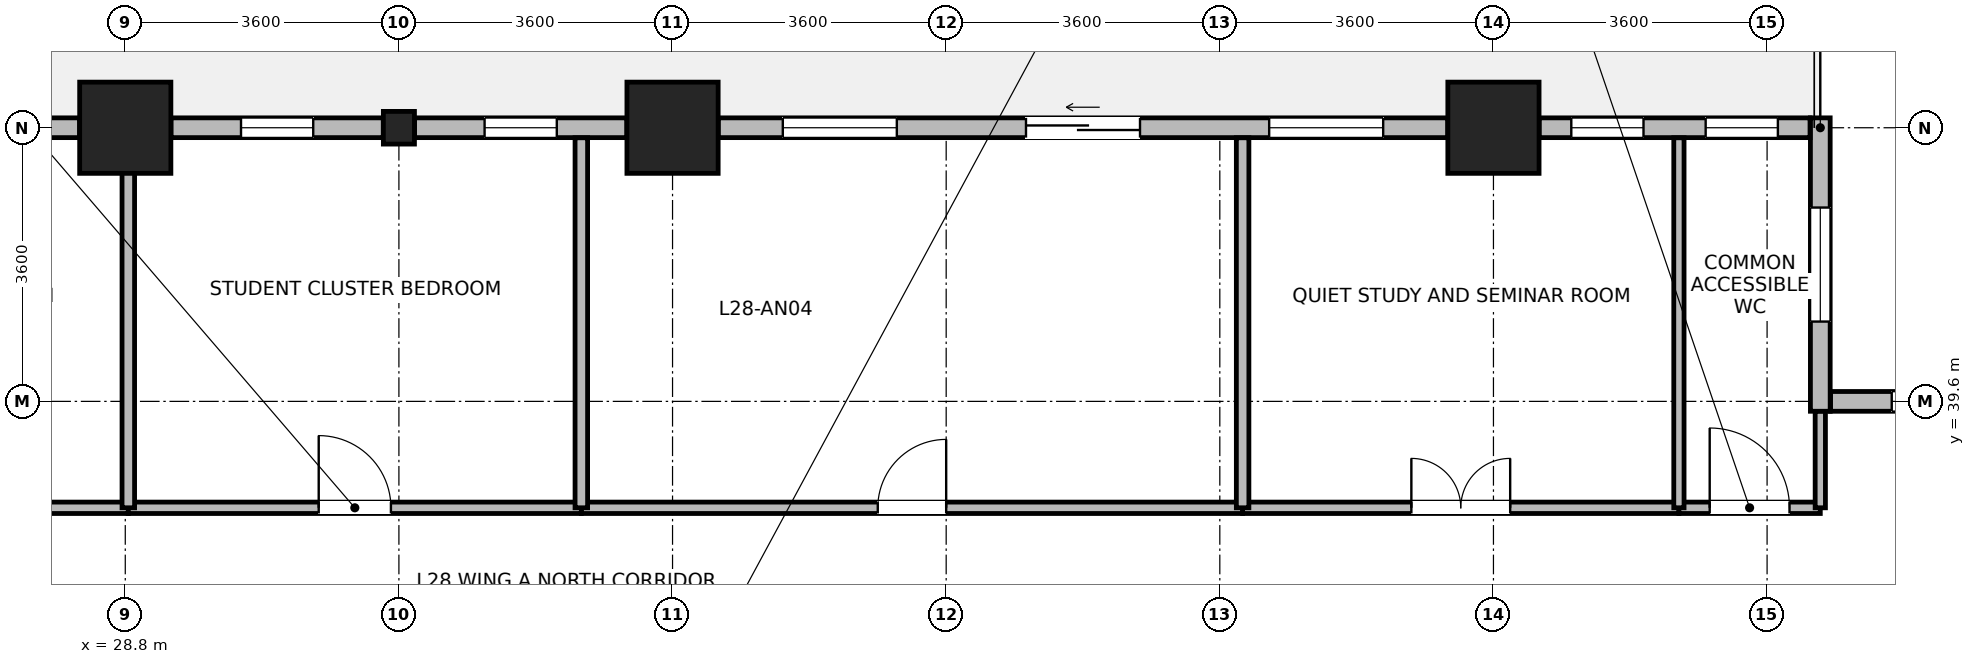
"""IFC4 building model, lengths in metres.
Left out: names, types, materials, properties, quantities, classifications, styles, units other than length and angle.
Written with IfcOpenShell. Run it as: python <this file> out.ifc"""

import sys

from ifc_helpers import new_model, si_unit, direction, frame, frame_2d, origin, origin_2d, place, context, subcontext, project, spatial, rectangle, i_section, extrude, source, transform, mapped, element, fill, save


model = new_model("IFC4")
c1 = context("Model", 3, precision=1e-05, world=origin(), true_north=direction((0.0, 1.0)))
c2 = subcontext(c1, "Body", "Model", "MODEL_VIEW")
j1 = project(units=[si_unit("LENGTHUNIT", "METRE"), si_unit("PLANEANGLEUNIT", "RADIAN")], contexts=[c1])
p1 = place(None, origin())
s1 = spatial("IfcSite", under=j1, at=p1, CompositionType="ELEMENT")
p2 = place(p1, origin())
s2 = spatial("IfcBuilding", under=s1, at=p2, CompositionType="ELEMENT")
p3 = place(p2, frame((0.0, 0.0, 111.9)))
s3 = spatial("IfcBuildingStorey", under=s2, at=p3, CompositionType="ELEMENT", Elevation=111.9)
m1 = source(origin(), c2, "Body", "SweptSolid", [
    extrude(rectangle(XDim=1.2, YDim=1.2, at=origin_2d()), origin(), (0.0, 0.0, 1.0), 3.7),
])
for number, where, z_axis, x_axis in (
    (1, (28.8, 43.2, 0.0), (0.0, 0.0, 1.0), (1.0, 0.0, 0.0)),
    (2, (36.0, 43.2, 0.0), (0.0, 0.0, 1.0), (1.0, 0.0, 0.0)),
    (3, (46.8, 43.2, 0.0), (0.0, 0.0, 1.0), (1.0, 0.0, 0.0)),
):
    element("IfcColumn", number, at=place(p3, frame(where, z_axis=z_axis, x_axis=x_axis)), inside=s3, PredefinedType="COLUMN", context=c2, shape_type="MappedRepresentation", body=[
        mapped(m1, transform((0.0, 0.0, 0.0), x_axis=(1.0, 0.0, 0.0), y_axis=(0.0, 1.0, 0.0), z_axis=(0.0, 0.0, 1.0), scale=1.0)),
    ])
m2 = source(origin(), c2, "Body", "SweptSolid", [
    extrude(i_section(OverallWidth=0.409, OverallDepth=0.43, WebThickness=0.024, FlangeThickness=0.033, FilletRadius=0.015, at=origin_2d()), origin(), (0.0, 0.0, 1.0), 3.7),
])
p4 = place(p3, frame((32.4, 43.2, 0.0), z_axis=(0.0, 0.0, 1.0), x_axis=(1.0, 0.0, 0.0)))
e4 = element("IfcColumn", 4, at=p4, inside=s3, PredefinedType="COLUMN", context=c2, shape_type="MappedRepresentation", body=[
    mapped(m2, transform((0.0, 0.0, 0.0), x_axis=(1.0, 0.0, 0.0), y_axis=(0.0, 1.0, 0.0), z_axis=(0.0, 0.0, 1.0), scale=1.0)),
])
p5 = place(p3, frame((51.235, 39.6, 0.0), z_axis=(0.0, 0.0, 1.0), x_axis=(1.0, 0.0, 0.0)))
e5 = element("IfcWall", 5, at=p5, inside=s3, PredefinedType="STANDARD", context=c2, shape_type="SweptSolid", body=[
    extrude(rectangle(XDim=9.33, YDim=0.26, at=frame_2d((4.665, 0.0))), origin(), (0.0, 0.0, 1.0), 3.43),
])
p6 = place(p5, frame((0.805, 0.0, 0.85)))
e6 = element("IfcOpeningElement", 6, at=p6, cuts=e5, PredefinedType="OPENING", context=c2, shape_type="SweptSolid", body=[
    extrude(rectangle(XDim=1.5, YDim=1.85, at=frame_2d((0.75, 0.925))), frame((0.0, 0.14, 0.0), z_axis=(0.0, -1.0, 0.0), x_axis=(1.0, 0.0, 0.0)), (0.0, 0.0, 1.0), 0.28),
])
p7 = place(p5, frame((3.915, 0.0, 0.85)))
e7 = element("IfcOpeningElement", 7, at=p7, cuts=e5, PredefinedType="OPENING", context=c2, shape_type="SweptSolid", body=[
    extrude(rectangle(XDim=1.5, YDim=1.85, at=frame_2d((0.75, 0.925))), frame((0.0, 0.14, 0.0), z_axis=(0.0, -1.0, 0.0), x_axis=(1.0, 0.0, 0.0)), (0.0, 0.0, 1.0), 0.28),
])
p8 = place(p5, frame((7.025, 0.0, 0.85)))
e8 = element("IfcOpeningElement", 8, at=p8, cuts=e5, PredefinedType="OPENING", context=c2, shape_type="SweptSolid", body=[
    extrude(rectangle(XDim=1.5, YDim=1.85, at=frame_2d((0.75, 0.925))), frame((0.0, 0.14, 0.0), z_axis=(0.0, -1.0, 0.0), x_axis=(1.0, 0.0, 0.0)), (0.0, 0.0, 1.0), 0.28),
])
p9 = place(p3, frame((51.1, 43.33, 0.0), z_axis=(0.0, 0.0, 1.0), x_axis=(0.0, -1.0, 0.0)))
e9 = element("IfcWall", 9, at=p9, inside=s3, PredefinedType="STANDARD", context=c2, shape_type="SweptSolid", body=[
    extrude(rectangle(XDim=3.86, YDim=0.26, at=frame_2d((1.93, 0.0))), origin(), (0.0, 0.0, 1.0), 3.43),
])
p10 = place(p9, frame((1.18, 0.0, 0.85)))
e10 = element("IfcOpeningElement", 10, at=p10, cuts=e9, PredefinedType="OPENING", context=c2, shape_type="SweptSolid", body=[
    extrude(rectangle(XDim=1.5, YDim=1.85, at=frame_2d((0.75, 0.925))), frame((0.0, 0.14, 0.0), z_axis=(0.0, -1.0, 0.0), x_axis=(1.0, 0.0, 0.0)), (0.0, 0.0, 1.0), 0.28),
])
p11 = place(p3, frame((47.401, 43.2, 0.0), z_axis=(0.0, 0.0, 1.0), x_axis=(1.0, 0.0, 0.0)))
e11 = element("IfcWall", 11, at=p11, inside=s3, PredefinedType="STANDARD", context=c2, shape_type="SweptSolid", body=[
    extrude(rectangle(XDim=3.564, YDim=0.26, at=frame_2d((1.782, 0.0))), origin(), (0.0, 0.0, 1.0), 3.43),
])
p12 = place(p11, frame((0.423, 0.0, 0.85)))
e12 = element("IfcOpeningElement", 12, at=p12, cuts=e11, PredefinedType="OPENING", context=c2, shape_type="SweptSolid", body=[
    extrude(rectangle(XDim=0.95, YDim=1.75, at=frame_2d((0.475, 0.875))), frame((0.0, 0.14, 0.0), z_axis=(0.0, -1.0, 0.0), x_axis=(1.0, 0.0, 0.0)), (0.0, 0.0, 1.0), 0.28),
])
p13 = place(p11, frame((2.191, 0.0, 0.85)))
e13 = element("IfcOpeningElement", 13, at=p13, cuts=e11, PredefinedType="OPENING", context=c2, shape_type="SweptSolid", body=[
    extrude(rectangle(XDim=0.95, YDim=1.75, at=frame_2d((0.475, 0.875))), frame((0.0, 0.14, 0.0), z_axis=(0.0, -1.0, 0.0), x_axis=(1.0, 0.0, 0.0)), (0.0, 0.0, 1.0), 0.28),
])
p14 = place(p3, frame((36.601, 43.2, 0.0), z_axis=(0.0, 0.0, 1.0), x_axis=(1.0, 0.0, 0.0)))
e14 = element("IfcWall", 14, at=p14, inside=s3, PredefinedType="STANDARD", context=c2, shape_type="SweptSolid", body=[
    extrude(rectangle(XDim=9.598, YDim=0.26, at=frame_2d((4.799, 0.0))), origin(), (0.0, 0.0, 1.0), 2.98),
])
p15 = place(p14, frame((4.049, 0.0, 0.0)))
e15 = element("IfcOpeningElement", 15, at=p15, cuts=e14, PredefinedType="OPENING", context=c2, shape_type="SweptSolid", body=[
    extrude(rectangle(XDim=1.5, YDim=2.15, at=frame_2d((0.75, 1.075))), frame((0.0, 0.14, 0.0), z_axis=(0.0, -1.0, 0.0), x_axis=(1.0, 0.0, 0.0)), (0.0, 0.0, 1.0), 0.28),
])
p16 = place(p14, frame((0.85, 0.0, 0.85)))
e16 = element("IfcOpeningElement", 16, at=p16, cuts=e14, PredefinedType="OPENING", context=c2, shape_type="SweptSolid", body=[
    extrude(rectangle(XDim=1.5, YDim=1.85, at=frame_2d((0.75, 0.925))), frame((0.0, 0.14, 0.0), z_axis=(0.0, -1.0, 0.0), x_axis=(1.0, 0.0, 0.0)), (0.0, 0.0, 1.0), 0.28),
])
p17 = place(p14, frame((7.248, 0.0, 0.85)))
e17 = element("IfcOpeningElement", 17, at=p17, cuts=e14, PredefinedType="OPENING", context=c2, shape_type="SweptSolid", body=[
    extrude(rectangle(XDim=1.5, YDim=1.85, at=frame_2d((0.75, 0.925))), frame((0.0, 0.14, 0.0), z_axis=(0.0, -1.0, 0.0), x_axis=(1.0, 0.0, 0.0)), (0.0, 0.0, 1.0), 0.28),
])
p18 = place(p3, frame((32.605, 43.2, 0.0), z_axis=(0.0, 0.0, 1.0), x_axis=(1.0, 0.0, 0.0)))
e18 = element("IfcWall", 18, at=p18, inside=s3, PredefinedType="STANDARD", context=c2, shape_type="SweptSolid", body=[
    extrude(rectangle(XDim=2.793, YDim=0.26, at=frame_2d((1.397, 0.0))), origin(), (0.0, 0.0, 1.0), 2.98),
])
p19 = place(p18, frame((0.922, 0.0, 0.85)))
e19 = element("IfcOpeningElement", 19, at=p19, cuts=e18, PredefinedType="OPENING", context=c2, shape_type="SweptSolid", body=[
    extrude(rectangle(XDim=0.95, YDim=1.75, at=frame_2d((0.475, 0.875))), frame((0.0, 0.14, 0.0), z_axis=(0.0, -1.0, 0.0), x_axis=(1.0, 0.0, 0.0)), (0.0, 0.0, 1.0), 0.28),
])
p20 = place(p3, frame((29.401, 43.2, 0.0), z_axis=(0.0, 0.0, 1.0), x_axis=(1.0, 0.0, 0.0)))
e20 = element("IfcWall", 20, at=p20, inside=s3, PredefinedType="STANDARD", context=c2, shape_type="SweptSolid", body=[
    extrude(rectangle(XDim=2.794, YDim=0.26, at=frame_2d((1.397, 0.0))), origin(), (0.0, 0.0, 1.0), 2.98),
])
p21 = place(p20, frame((0.922, 0.0, 0.85)))
e21 = element("IfcOpeningElement", 21, at=p21, cuts=e20, PredefinedType="OPENING", context=c2, shape_type="SweptSolid", body=[
    extrude(rectangle(XDim=0.95, YDim=1.75, at=frame_2d((0.475, 0.875))), frame((0.0, 0.14, 0.0), z_axis=(0.0, -1.0, 0.0), x_axis=(1.0, 0.0, 0.0)), (0.0, 0.0, 1.0), 0.28),
])
p22 = place(p3, frame((25.406, 43.2, 0.0), z_axis=(0.0, 0.0, 1.0), x_axis=(1.0, 0.0, 0.0)))
e22 = element("IfcWall", 22, at=p22, inside=s3, PredefinedType="STANDARD", context=c2, shape_type="SweptSolid", body=[
    extrude(rectangle(XDim=2.793, YDim=0.26, at=frame_2d((1.397, 0.0))), origin(), (0.0, 0.0, 1.0), 2.98),
])
p23 = place(p22, frame((0.922, 0.0, 0.85)))
e23 = element("IfcOpeningElement", 23, at=p23, cuts=e22, PredefinedType="OPENING", context=c2, shape_type="SweptSolid", body=[
    extrude(rectangle(XDim=0.95, YDim=1.75, at=frame_2d((0.475, 0.875))), frame((0.0, 0.14, 0.0), z_axis=(0.0, -1.0, 0.0), x_axis=(1.0, 0.0, 0.0)), (0.0, 0.0, 1.0), 0.28),
])
p24 = place(p3, frame((34.8, 38.2, 0.0), z_axis=(0.0, 0.0, 1.0), x_axis=(1.0, 0.0, 0.0)))
e24 = element("IfcWall", 24, at=p24, inside=s3, PredefinedType="PARTITIONING", context=c2, shape_type="SweptSolid", body=[
    extrude(rectangle(XDim=8.7, YDim=0.15, at=frame_2d((4.35, 0.0))), origin(), (0.0, 0.0, 1.0), 3.43),
])
p25 = place(p24, frame((3.9, 0.0, 0.0)))
e25 = element("IfcOpeningElement", 25, at=p25, cuts=e24, PredefinedType="OPENING", context=c2, shape_type="SweptSolid", body=[
    extrude(rectangle(XDim=0.9, YDim=2.08, at=frame_2d((0.45, 1.04))), frame((0.0, 0.085, 0.0), z_axis=(0.0, -1.0, 0.0), x_axis=(1.0, 0.0, 0.0)), (0.0, 0.0, 1.0), 0.17),
])
p26 = place(p3, frame((22.42, 38.2, 0.0), z_axis=(0.0, 0.0, 1.0), x_axis=(1.0, 0.0, 0.0)))
e26 = element("IfcWall", 26, at=p26, inside=s3, PredefinedType="PARTITIONING", context=c2, shape_type="SweptSolid", body=[
    extrude(rectangle(XDim=6.42, YDim=0.15, at=frame_2d((3.21, 0.0))), origin(), (0.0, 0.0, 1.0), 3.43),
])
p27 = place(p26, frame((2.56, 0.0, 0.0)))
e27 = element("IfcOpeningElement", 27, at=p27, cuts=e26, PredefinedType="OPENING", context=c2, shape_type="SweptSolid", body=[
    extrude(rectangle(XDim=1.3, YDim=2.12, at=frame_2d((0.65, 1.06))), frame((0.0, 0.085, 0.0), z_axis=(0.0, -1.0, 0.0), x_axis=(1.0, 0.0, 0.0)), (0.0, 0.0, 1.0), 0.17),
])
p28 = place(p3, frame((28.84, 38.2, 0.0), z_axis=(0.0, 0.0, 1.0), x_axis=(1.0, 0.0, 0.0)))
e28 = element("IfcWall", 28, at=p28, inside=s3, PredefinedType="PARTITIONING", context=c2, shape_type="SweptSolid", body=[
    extrude(rectangle(XDim=5.96, YDim=0.15, at=frame_2d((2.98, 0.0))), origin(), (0.0, 0.0, 1.0), 3.43),
])
p29 = place(p28, frame((2.505, 0.0, 0.0)))
e29 = element("IfcOpeningElement", 29, at=p29, cuts=e28, PredefinedType="OPENING", context=c2, shape_type="SweptSolid", body=[
    extrude(rectangle(XDim=0.95, YDim=2.1, at=frame_2d((0.475, 1.05))), frame((0.0, 0.085, 0.0), z_axis=(0.0, -1.0, 0.0), x_axis=(1.0, 0.0, 0.0)), (0.0, 0.0, 1.0), 0.17),
])
p30 = place(p3, frame((43.5, 38.2, 0.0), z_axis=(0.0, 0.0, 1.0), x_axis=(1.0, 0.0, 0.0)))
e30 = element("IfcWall", 30, at=p30, inside=s3, PredefinedType="PARTITIONING", context=c2, shape_type="SweptSolid", body=[
    extrude(rectangle(XDim=5.74, YDim=0.15, at=frame_2d((2.87, 0.0))), origin(), (0.0, 0.0, 1.0), 3.43),
])
p31 = place(p30, frame((2.22, 0.0, 0.0)))
e31 = element("IfcOpeningElement", 31, at=p31, cuts=e30, PredefinedType="OPENING", context=c2, shape_type="SweptSolid", body=[
    extrude(rectangle(XDim=1.3, YDim=2.12, at=frame_2d((0.65, 1.06))), frame((0.0, 0.085, 0.0), z_axis=(0.0, -1.0, 0.0), x_axis=(1.0, 0.0, 0.0)), (0.0, 0.0, 1.0), 0.17),
])
p32 = place(p3, frame((49.24, 38.2, 0.0), z_axis=(0.0, 0.0, 1.0), x_axis=(1.0, 0.0, 0.0)))
e32 = element("IfcWall", 32, at=p32, inside=s3, PredefinedType="PARTITIONING", context=c2, shape_type="SweptSolid", body=[
    extrude(rectangle(XDim=1.86, YDim=0.15, at=frame_2d((0.93, 0.0))), origin(), (0.0, 0.0, 1.0), 3.43),
])
p33 = place(p32, frame((0.405, 0.0, 0.0)))
e33 = element("IfcOpeningElement", 33, at=p33, cuts=e32, PredefinedType="OPENING", context=c2, shape_type="SweptSolid", body=[
    extrude(rectangle(XDim=1.05, YDim=2.12, at=frame_2d((0.525, 1.06))), frame((0.0, 0.085, 0.0), z_axis=(0.0, -1.0, 0.0), x_axis=(1.0, 0.0, 0.0)), (0.0, 0.0, 1.0), 0.17),
])
p34 = place(p3, frame((28.84, 38.2, 0.0), z_axis=(0.0, 0.0, 1.0), x_axis=(0.0, 1.0, 0.0)))
e34 = element("IfcWall", 34, at=p34, inside=s3, PredefinedType="PARTITIONING", context=c2, shape_type="SweptSolid", body=[
    extrude(rectangle(XDim=4.868, YDim=0.165, at=frame_2d((2.434, 0.0))), origin(), (0.0, 0.0, 1.0), 2.93),
])
for number, where, z_axis, x_axis in (
    (35, (34.8, 38.2, 0.0), (0.0, 0.0, 1.0), (0.0, 1.0, 0.0)),
    (36, (43.5, 38.2, 0.0), (0.0, 0.0, 1.0), (0.0, 1.0, 0.0)),
):
    element("IfcWall", number, at=place(p3, frame(where, z_axis=z_axis, x_axis=x_axis)), inside=s3, PredefinedType="PARTITIONING", context=c2, shape_type="SweptSolid", body=[
        extrude(rectangle(XDim=4.868, YDim=0.165, at=frame_2d((2.434, 0.0))), origin(), (0.0, 0.0, 1.0), 3.43),
    ])
p35 = place(p3, frame((49.24, 38.2, 0.0), z_axis=(0.0, 0.0, 1.0), x_axis=(0.0, 1.0, 0.0)))
e37 = element("IfcWall", 37, at=p35, inside=s3, PredefinedType="PARTITIONING", context=c2, shape_type="SweptSolid", body=[
    extrude(rectangle(XDim=4.868, YDim=0.135, at=frame_2d((2.434, 0.0))), origin(), (0.0, 0.0, 1.0), 3.43),
])
p36 = place(p3, frame((51.1, 38.2, 0.0), z_axis=(0.0, 0.0, 1.0), x_axis=(0.0, 1.0, 0.0)))
e38 = element("IfcWall", 38, at=p36, inside=s3, PredefinedType="PARTITIONING", context=c2, shape_type="SweptSolid", body=[
    extrude(rectangle(XDim=1.268, YDim=0.135, at=frame_2d((0.634, 0.0))), origin(), (0.0, 0.0, 1.0), 3.43),
])
p37 = place(p6, origin())
e39 = element("IfcWindow", 39, at=p37, inside=s3, PartitioningType="SINGLE_PANEL", PredefinedType="WINDOW", context=c2, shape_type="SweptSolid", body=[
    extrude(rectangle(XDim=1.5, YDim=1.85, at=frame_2d((0.75, 0.925))), frame((0.0, 0.03, 0.0), z_axis=(0.0, -1.0, 0.0), x_axis=(1.0, 0.0, 0.0)), (0.0, 0.0, 1.0), 0.06),
])
fill(e6, e39)
p38 = place(p10, origin())
e40 = element("IfcWindow", 40, at=p38, inside=s3, PartitioningType="SINGLE_PANEL", PredefinedType="WINDOW", context=c2, shape_type="SweptSolid", body=[
    extrude(rectangle(XDim=1.5, YDim=1.85, at=frame_2d((0.75, 0.925))), frame((0.0, 0.03, 0.0), z_axis=(0.0, -1.0, 0.0), x_axis=(1.0, 0.0, 0.0)), (0.0, 0.0, 1.0), 0.06),
])
fill(e10, e40)
p39 = place(p12, origin())
e41 = element("IfcWindow", 41, at=p39, inside=s3, PartitioningType="SINGLE_PANEL", PredefinedType="WINDOW", context=c2, shape_type="SweptSolid", body=[
    extrude(rectangle(XDim=0.95, YDim=1.75, at=frame_2d((0.475, 0.875))), frame((0.0, 0.03, 0.0), z_axis=(0.0, -1.0, 0.0), x_axis=(1.0, 0.0, 0.0)), (0.0, 0.0, 1.0), 0.06),
])
fill(e12, e41)
p40 = place(p13, origin())
e42 = element("IfcWindow", 42, at=p40, inside=s3, PartitioningType="SINGLE_PANEL", PredefinedType="WINDOW", context=c2, shape_type="SweptSolid", body=[
    extrude(rectangle(XDim=0.95, YDim=1.75, at=frame_2d((0.475, 0.875))), frame((0.0, 0.03, 0.0), z_axis=(0.0, -1.0, 0.0), x_axis=(1.0, 0.0, 0.0)), (0.0, 0.0, 1.0), 0.06),
])
fill(e13, e42)
p41 = place(p15, origin())
e43 = element("IfcDoor", 43, at=p41, inside=s3, OperationType="SLIDING_TO_LEFT", PredefinedType="DOOR", context=c2, shape_type="SweptSolid", body=[
    extrude(rectangle(XDim=1.5, YDim=2.15, at=frame_2d((0.75, 1.075))), frame((0.0, 0.025, 0.0), z_axis=(0.0, -1.0, 0.0), x_axis=(1.0, 0.0, 0.0)), (0.0, 0.0, 1.0), 0.05),
])
fill(e15, e43)
p42 = place(p16, origin())
e44 = element("IfcWindow", 44, at=p42, inside=s3, PartitioningType="SINGLE_PANEL", PredefinedType="WINDOW", context=c2, shape_type="SweptSolid", body=[
    extrude(rectangle(XDim=1.5, YDim=1.85, at=frame_2d((0.75, 0.925))), frame((0.0, 0.03, 0.0), z_axis=(0.0, -1.0, 0.0), x_axis=(1.0, 0.0, 0.0)), (0.0, 0.0, 1.0), 0.06),
])
fill(e16, e44)
p43 = place(p17, origin())
e45 = element("IfcWindow", 45, at=p43, inside=s3, PartitioningType="SINGLE_PANEL", PredefinedType="WINDOW", context=c2, shape_type="SweptSolid", body=[
    extrude(rectangle(XDim=1.5, YDim=1.85, at=frame_2d((0.75, 0.925))), frame((0.0, 0.03, 0.0), z_axis=(0.0, -1.0, 0.0), x_axis=(1.0, 0.0, 0.0)), (0.0, 0.0, 1.0), 0.06),
])
fill(e17, e45)
p44 = place(p19, origin())
e46 = element("IfcWindow", 46, at=p44, inside=s3, PartitioningType="SINGLE_PANEL", PredefinedType="WINDOW", context=c2, shape_type="SweptSolid", body=[
    extrude(rectangle(XDim=0.95, YDim=1.75, at=frame_2d((0.475, 0.875))), frame((0.0, 0.03, 0.0), z_axis=(0.0, -1.0, 0.0), x_axis=(1.0, 0.0, 0.0)), (0.0, 0.0, 1.0), 0.06),
])
fill(e19, e46)
p45 = place(p21, origin())
e47 = element("IfcWindow", 47, at=p45, inside=s3, PartitioningType="SINGLE_PANEL", PredefinedType="WINDOW", context=c2, shape_type="SweptSolid", body=[
    extrude(rectangle(XDim=0.95, YDim=1.75, at=frame_2d((0.475, 0.875))), frame((0.0, 0.03, 0.0), z_axis=(0.0, -1.0, 0.0), x_axis=(1.0, 0.0, 0.0)), (0.0, 0.0, 1.0), 0.06),
])
fill(e21, e47)
p46 = place(p25, origin())
e48 = element("IfcDoor", 48, at=p46, inside=s3, OperationType="SINGLE_SWING_RIGHT", PredefinedType="DOOR", context=c2, shape_type="SweptSolid", body=[
    extrude(rectangle(XDim=0.9, YDim=2.08, at=frame_2d((0.45, 1.04))), frame((0.0, 0.025, 0.0), z_axis=(0.0, -1.0, 0.0), x_axis=(1.0, 0.0, 0.0)), (0.0, 0.0, 1.0), 0.05),
])
fill(e25, e48)
p47 = place(p29, origin())
e49 = element("IfcDoor", 49, at=p47, inside=s3, OperationType="SINGLE_SWING_LEFT", PredefinedType="DOOR", context=c2, shape_type="SweptSolid", body=[
    extrude(rectangle(XDim=0.95, YDim=2.1, at=frame_2d((0.475, 1.05))), frame((0.0, 0.025, 0.0), z_axis=(0.0, -1.0, 0.0), x_axis=(1.0, 0.0, 0.0)), (0.0, 0.0, 1.0), 0.05),
])
fill(e29, e49)
p48 = place(p31, origin())
e50 = element("IfcDoor", 50, at=p48, inside=s3, OperationType="DOUBLE_DOOR_SINGLE_SWING", PredefinedType="DOOR", context=c2, shape_type="SweptSolid", body=[
    extrude(rectangle(XDim=1.3, YDim=2.12, at=frame_2d((0.65, 1.06))), frame((0.0, 0.025, 0.0), z_axis=(0.0, -1.0, 0.0), x_axis=(1.0, 0.0, 0.0)), (0.0, 0.0, 1.0), 0.05),
])
fill(e31, e50)
p49 = place(p33, origin())
e51 = element("IfcDoor", 51, at=p49, inside=s3, OperationType="SINGLE_SWING_LEFT", PredefinedType="DOOR", context=c2, shape_type="SweptSolid", body=[
    extrude(rectangle(XDim=1.05, YDim=2.12, at=frame_2d((0.525, 1.06))), frame((0.0, 0.025, 0.0), z_axis=(0.0, -1.0, 0.0), x_axis=(1.0, 0.0, 0.0)), (0.0, 0.0, 1.0), 0.05),
])
fill(e33, e51)
save(model, sys.argv[1])
